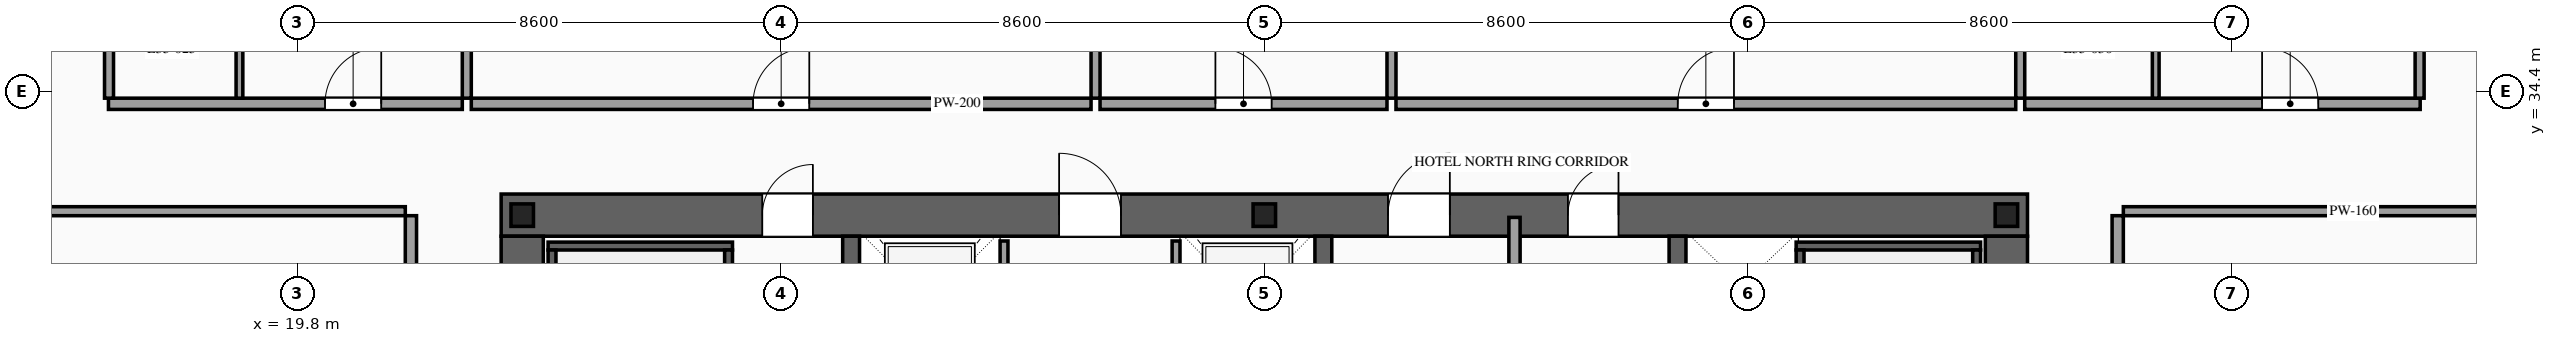
"""IFC4 building model, lengths in metres.
Left out: names, types, materials, properties, quantities, classifications, styles, units other than length and angle.
Written with IfcOpenShell. Run it as: python <this file> out.ifc"""

import sys

from ifc_helpers import new_model, si_unit, direction, frame, frame_2d, origin, origin_2d, place, context, subcontext, project, spatial, rectangle, i_section, extrude, source, transform, mapped, element, fill, save


model = new_model("IFC4")
c1 = context("Model", 3, precision=1e-05, world=origin(), true_north=direction((0.0, 1.0)))
c2 = subcontext(c1, "Body", "Model", "MODEL_VIEW")
j1 = project(units=[si_unit("LENGTHUNIT", "METRE"), si_unit("PLANEANGLEUNIT", "RADIAN")], contexts=[c1])
p1 = place(None, origin())
s1 = spatial("IfcSite", under=j1, at=p1, CompositionType="ELEMENT")
p2 = place(p1, origin())
s2 = spatial("IfcBuilding", under=s1, at=p2, CompositionType="ELEMENT")
p3 = place(p2, frame((0.0, 0.0, 134.4)))
s3 = spatial("IfcBuildingStorey", under=s2, at=p3, CompositionType="ELEMENT", Elevation=134.4)
p4 = place(p3, frame((23.425, 32.2, 0.0), z_axis=(0.0, 0.0, 1.0), x_axis=(1.0, 0.0, 0.0)))
e1 = element("IfcWall", 1, at=p4, inside=s3, PredefinedType="SHEAR", context=c2, shape_type="SweptSolid", body=[
    extrude(rectangle(XDim=27.15, YDim=0.75, at=frame_2d((13.575, 0.0))), origin(), (0.0, 0.0, 1.0), 3.6),
])
p5 = place(p4, frame((4.645, 0.0, 0.0)))
e2 = element("IfcOpeningElement", 2, at=p5, cuts=e1, PredefinedType="OPENING", context=c2, shape_type="SweptSolid", body=[
    extrude(rectangle(XDim=0.9, YDim=2.15, at=frame_2d((0.45, 1.075))), frame((0.0, 0.39, 0.0), z_axis=(0.0, -1.0, 0.0), x_axis=(1.0, 0.0, 0.0)), (0.0, 0.0, 1.0), 0.78),
])
p6 = place(p4, frame((9.925, 0.0, 0.0)))
e3 = element("IfcOpeningElement", 3, at=p6, cuts=e1, PredefinedType="OPENING", context=c2, shape_type="SweptSolid", body=[
    extrude(rectangle(XDim=1.1, YDim=2.2, at=frame_2d((0.55, 1.1))), frame((0.0, 0.39, 0.0), z_axis=(0.0, -1.0, 0.0), x_axis=(1.0, 0.0, 0.0)), (0.0, 0.0, 1.0), 0.78),
])
p7 = place(p4, frame((15.775, 0.0, 0.0)))
e4 = element("IfcOpeningElement", 4, at=p7, cuts=e1, PredefinedType="OPENING", context=c2, shape_type="SweptSolid", body=[
    extrude(rectangle(XDim=1.1, YDim=2.2, at=frame_2d((0.55, 1.1))), frame((0.0, 0.39, 0.0), z_axis=(0.0, -1.0, 0.0), x_axis=(1.0, 0.0, 0.0)), (0.0, 0.0, 1.0), 0.78),
])
p8 = place(p4, frame((18.975, 0.0, 0.0)))
e5 = element("IfcOpeningElement", 5, at=p8, cuts=e1, PredefinedType="OPENING", context=c2, shape_type="SweptSolid", body=[
    extrude(rectangle(XDim=0.9, YDim=2.15, at=frame_2d((0.45, 1.075))), frame((0.0, 0.39, 0.0), z_axis=(0.0, -1.0, 0.0), x_axis=(1.0, 0.0, 0.0)), (0.0, 0.0, 1.0), 0.78),
])
m1 = source(origin(), c2, "Body", "SweptSolid", [
    extrude(rectangle(XDim=12.05, YDim=0.75, at=frame_2d((6.025, 0.0))), origin(), (0.0, 0.0, 1.0), 3.6),
])
for number, where, z_axis, x_axis in (
    (6, (23.8, 19.775, 0.0), (0.0, 0.0, 1.0), (0.0, 1.0, 0.0)),
    (7, (50.2, 19.775, 0.0), (0.0, 0.0, 1.0), (0.0, 1.0, 0.0)),
):
    element("IfcWall", number, at=place(p3, frame(where, z_axis=z_axis, x_axis=x_axis)), inside=s3, PredefinedType="SHEAR", context=c2, shape_type="MappedRepresentation", body=[
        mapped(m1, transform((0.0, 0.0, 0.0), scale=1.0)),
    ])
m2 = source(origin(), c2, "Body", "SweptSolid", [
    extrude(rectangle(XDim=12.05, YDim=0.3, at=frame_2d((6.025, 0.0))), origin(), (0.0, 0.0, 1.0), 3.6),
])
for number, where, z_axis, x_axis in (
    (8, (29.65, 19.775, 0.0), (0.0, 0.0, 1.0), (0.0, 1.0, 0.0)),
    (9, (38.05, 19.775, 0.0), (0.0, 0.0, 1.0), (0.0, 1.0, 0.0)),
    (10, (44.35, 19.775, 0.0), (0.0, 0.0, 1.0), (0.0, 1.0, 0.0)),
):
    element("IfcWall", number, at=place(p3, frame(where, z_axis=z_axis, x_axis=x_axis)), inside=s3, PredefinedType="SOLIDWALL", context=c2, shape_type="MappedRepresentation", body=[
        mapped(m2, transform((0.0, 0.0, 0.0), scale=1.0)),
    ])
m3 = source(origin(), c2, "Body", "SweptSolid", [
    extrude(i_section(OverallWidth=0.4, OverallDepth=0.4, WebThickness=0.013, FlangeThickness=0.021, at=origin_2d()), origin(), (0.0, 0.0, 1.0), 3.6),
])
for number, where, z_axis, x_axis in (
    (11, (23.8, 32.2, 0.0), (0.0, 0.0, 1.0), (1.0, 0.0, 0.0)),
    (12, (37.0, 32.2, 0.0), (0.0, 0.0, 1.0), (1.0, 0.0, 0.0)),
    (13, (50.2, 32.2, 0.0), (0.0, 0.0, 1.0), (1.0, 0.0, 0.0)),
):
    element("IfcColumn", number, at=place(p3, frame(where, z_axis=z_axis, x_axis=x_axis)), inside=s3, PredefinedType="COLUMN", context=c2, shape_type="MappedRepresentation", body=[
        mapped(m3, transform((0.0, 0.0, 0.0), scale=1.0)),
    ])
p9 = place(p3, frame((32.37, 29.4, 0.0), z_axis=(0.0, 0.0, 1.0), x_axis=(0.0, 1.0, 0.0)))
e14 = element("IfcWall", 14, at=p9, inside=s3, PredefinedType="SOLIDWALL", context=c2, shape_type="SweptSolid", body=[
    extrude(rectangle(XDim=2.34, YDim=0.14, at=frame_2d((1.17, 0.0))), origin(), (0.0, 0.0, 1.0), 3.38),
])
p10 = place(p9, frame((0.62, 0.0, 0.0)))
e15 = element("IfcOpeningElement", 15, at=p10, cuts=e14, PredefinedType="OPENING", context=c2, shape_type="SweptSolid", body=[
    extrude(rectangle(XDim=1.1, YDim=2.2, at=frame_2d((0.55, 1.1))), frame((0.0, 0.085, 0.0), z_axis=(0.0, -1.0, 0.0), x_axis=(1.0, 0.0, 0.0)), (0.0, 0.0, 1.0), 0.17),
])
p11 = place(p3, frame((35.43, 29.4, 0.0), z_axis=(0.0, 0.0, 1.0), x_axis=(0.0, 1.0, 0.0)))
e16 = element("IfcWall", 16, at=p11, inside=s3, PredefinedType="SOLIDWALL", context=c2, shape_type="SweptSolid", body=[
    extrude(rectangle(XDim=2.34, YDim=0.14, at=frame_2d((1.17, 0.0))), origin(), (0.0, 0.0, 1.0), 3.38),
])
p12 = place(p11, frame((0.62, 0.0, 0.0)))
e17 = element("IfcOpeningElement", 17, at=p12, cuts=e16, PredefinedType="OPENING", context=c2, shape_type="SweptSolid", body=[
    extrude(rectangle(XDim=1.1, YDim=2.2, at=frame_2d((0.55, 1.1))), frame((0.0, 0.085, 0.0), z_axis=(0.0, -1.0, 0.0), x_axis=(1.0, 0.0, 0.0)), (0.0, 0.0, 1.0), 0.17),
])
m4 = source(origin(), c2, "Body", "SweptSolid", [
    extrude(rectangle(XDim=3.28, YDim=0.14, at=frame_2d((1.64, 0.0))), origin(), (0.0, 0.0, 1.0), 3.38),
])
p13 = place(p3, frame((24.26, 31.65, 0.0), z_axis=(0.0, 0.0, 1.0), x_axis=(1.0, 0.0, 0.0)))
e18 = element("IfcWall", 18, at=p13, inside=s3, PredefinedType="SOLIDWALL", context=c2, shape_type="MappedRepresentation", body=[
    mapped(m4, transform((0.0, 0.0, 0.0), scale=1.0)),
])
m5 = source(origin(), c2, "Body", "SweptSolid", [
    extrude(rectangle(XDim=8.94, YDim=0.14, at=frame_2d((4.47, 0.0))), origin(), (0.0, 0.0, 1.0), 3.38),
])
for number, where, z_axis, x_axis in (
    (19, (24.33, 22.64, 0.0), (0.0, 0.0, 1.0), (0.0, 1.0, 0.0)),
    (20, (27.47, 22.64, 0.0), (0.0, 0.0, 1.0), (0.0, 1.0, 0.0)),
):
    element("IfcWall", number, at=place(p3, frame(where, z_axis=z_axis, x_axis=x_axis)), inside=s3, PredefinedType="SOLIDWALL", context=c2, shape_type="MappedRepresentation", body=[
        mapped(m5, transform((0.0, 0.0, 0.0), scale=1.0)),
    ])
p14 = place(p3, frame((46.46, 31.65, 0.0), z_axis=(0.0, 0.0, 1.0), x_axis=(1.0, 0.0, 0.0)))
e21 = element("IfcWall", 21, at=p14, inside=s3, PredefinedType="SOLIDWALL", context=c2, shape_type="MappedRepresentation", body=[
    mapped(m4, transform((0.0, 0.0, 0.0), scale=1.0)),
])
for number, where, z_axis, x_axis in (
    (22, (46.53, 22.64, 0.0), (0.0, 0.0, 1.0), (0.0, 1.0, 0.0)),
    (23, (49.67, 22.64, 0.0), (0.0, 0.0, 1.0), (0.0, 1.0, 0.0)),
):
    element("IfcWall", number, at=place(p3, frame(where, z_axis=z_axis, x_axis=x_axis)), inside=s3, PredefinedType="SOLIDWALL", context=c2, shape_type="MappedRepresentation", body=[
        mapped(m5, transform((0.0, 0.0, 0.0), scale=1.0)),
    ])
m6 = source(origin(), c2, "Body", "SweptSolid", [
    extrude(rectangle(XDim=5.96, YDim=0.2, at=frame_2d((2.98, 0.0))), origin(), (0.0, 0.0, 1.0), 3.38),
])
p15 = place(p3, frame((41.45, 26.2, 0.0), z_axis=(0.0, 0.0, 1.0), x_axis=(0.0, 1.0, 0.0)))
e24 = element("IfcWall", 24, at=p15, inside=s3, PredefinedType="PARTITIONING", context=c2, shape_type="MappedRepresentation", body=[
    mapped(m6, transform((0.0, 0.0, 0.0), scale=1.0)),
])
p16 = place(p3, frame((16.44, 34.18, 0.0), z_axis=(0.0, 0.0, 1.0), x_axis=(1.0, 0.0, 0.0)))
e25 = element("IfcWall", 25, at=p16, inside=s3, PredefinedType="PARTITIONING", context=c2, shape_type="SweptSolid", body=[
    extrude(rectangle(XDim=6.294, YDim=0.2, at=frame_2d((3.147, 0.0))), origin(), (0.0, 0.0, 1.0), 3.38),
])
p17 = place(p16, frame((3.852, 0.0, 0.0)))
e26 = element("IfcOpeningElement", 26, at=p17, cuts=e25, PredefinedType="OPENING", context=c2, shape_type="SweptSolid", body=[
    extrude(rectangle(XDim=1.0, YDim=2.2, at=frame_2d((0.5, 1.1))), frame((0.0, 0.115, 0.0), z_axis=(0.0, -1.0, 0.0), x_axis=(1.0, 0.0, 0.0)), (0.0, 0.0, 1.0), 0.23),
])
m7 = source(origin(), c2, "Body", "SweptSolid", [
    extrude(rectangle(XDim=14.97, YDim=0.16, at=frame_2d((7.485, 0.0))), origin(), (0.0, 0.0, 1.0), 3.38),
])
p18 = place(p3, frame((22.814, 34.28, 0.0), z_axis=(0.0, 0.0, 1.0), x_axis=(0.0, 1.0, 0.0)))
e27 = element("IfcWall", 27, at=p18, inside=s3, PredefinedType="PARTITIONING", context=c2, shape_type="MappedRepresentation", body=[
    mapped(m7, transform((0.0, 0.0, 0.0), scale=1.0)),
])
m8 = source(origin(), c2, "Body", "SweptSolid", [
    extrude(rectangle(XDim=2.42, YDim=0.12, at=frame_2d((1.21, 0.0))), origin(), (0.0, 0.0, 1.0), 3.38),
])
p19 = place(p3, frame((18.77, 34.28, 0.0), z_axis=(0.0, 0.0, 1.0), x_axis=(0.0, 1.0, 0.0)))
e28 = element("IfcWall", 28, at=p19, inside=s3, PredefinedType="PARTITIONING", context=c2, shape_type="MappedRepresentation", body=[
    mapped(m8, transform((0.0, 0.0, 0.0), scale=1.0)),
])
p20 = place(p3, frame((22.894, 34.18, 0.0), z_axis=(0.0, 0.0, 1.0), x_axis=(1.0, 0.0, 0.0)))
e29 = element("IfcWall", 29, at=p20, inside=s3, PredefinedType="PARTITIONING", context=c2, shape_type="SweptSolid", body=[
    extrude(rectangle(XDim=11.024, YDim=0.2, at=frame_2d((5.512, 0.0))), origin(), (0.0, 0.0, 1.0), 3.38),
])
p21 = place(p20, frame((5.012, 0.0, 0.0)))
e30 = element("IfcOpeningElement", 30, at=p21, cuts=e29, PredefinedType="OPENING", context=c2, shape_type="SweptSolid", body=[
    extrude(rectangle(XDim=1.0, YDim=2.2, at=frame_2d((0.5, 1.1))), frame((0.0, 0.115, 0.0), z_axis=(0.0, -1.0, 0.0), x_axis=(1.0, 0.0, 0.0)), (0.0, 0.0, 1.0), 0.23),
])
p22 = place(p3, frame((33.998, 34.28, 0.0), z_axis=(0.0, 0.0, 1.0), x_axis=(0.0, 1.0, 0.0)))
e31 = element("IfcWall", 31, at=p22, inside=s3, PredefinedType="PARTITIONING", context=c2, shape_type="MappedRepresentation", body=[
    mapped(m7, transform((0.0, 0.0, 0.0), scale=1.0)),
])
p23 = place(p3, frame((34.078, 34.18, 0.0), z_axis=(0.0, 0.0, 1.0), x_axis=(1.0, 0.0, 0.0)))
e32 = element("IfcWall", 32, at=p23, inside=s3, PredefinedType="PARTITIONING", context=c2, shape_type="SweptSolid", body=[
    extrude(rectangle(XDim=5.104, YDim=0.2, at=frame_2d((2.552, 0.0))), origin(), (0.0, 0.0, 1.0), 3.38),
])
p24 = place(p23, frame((2.052, 0.0, 0.0)))
e33 = element("IfcOpeningElement", 33, at=p24, cuts=e32, PredefinedType="OPENING", context=c2, shape_type="SweptSolid", body=[
    extrude(rectangle(XDim=1.0, YDim=2.2, at=frame_2d((0.5, 1.1))), frame((0.0, 0.115, 0.0), z_axis=(0.0, -1.0, 0.0), x_axis=(1.0, 0.0, 0.0)), (0.0, 0.0, 1.0), 0.23),
])
p25 = place(p3, frame((39.262, 34.28, 0.0), z_axis=(0.0, 0.0, 1.0), x_axis=(0.0, 1.0, 0.0)))
e34 = element("IfcWall", 34, at=p25, inside=s3, PredefinedType="PARTITIONING", context=c2, shape_type="MappedRepresentation", body=[
    mapped(m7, transform((0.0, 0.0, 0.0), scale=1.0)),
])
p26 = place(p3, frame((39.342, 34.18, 0.0), z_axis=(0.0, 0.0, 1.0), x_axis=(1.0, 0.0, 0.0)))
e35 = element("IfcWall", 35, at=p26, inside=s3, PredefinedType="PARTITIONING", context=c2, shape_type="SweptSolid", body=[
    extrude(rectangle(XDim=11.024, YDim=0.2, at=frame_2d((5.512, 0.0))), origin(), (0.0, 0.0, 1.0), 3.38),
])
p27 = place(p26, frame((5.012, 0.0, 0.0)))
e36 = element("IfcOpeningElement", 36, at=p27, cuts=e35, PredefinedType="OPENING", context=c2, shape_type="SweptSolid", body=[
    extrude(rectangle(XDim=1.0, YDim=2.2, at=frame_2d((0.5, 1.1))), frame((0.0, 0.115, 0.0), z_axis=(0.0, -1.0, 0.0), x_axis=(1.0, 0.0, 0.0)), (0.0, 0.0, 1.0), 0.23),
])
p28 = place(p3, frame((50.446, 34.28, 0.0), z_axis=(0.0, 0.0, 1.0), x_axis=(0.0, 1.0, 0.0)))
e37 = element("IfcWall", 37, at=p28, inside=s3, PredefinedType="PARTITIONING", context=c2, shape_type="MappedRepresentation", body=[
    mapped(m7, transform((0.0, 0.0, 0.0), scale=1.0)),
])
p29 = place(p3, frame((50.526, 34.18, 0.0), z_axis=(0.0, 0.0, 1.0), x_axis=(1.0, 0.0, 0.0)))
e38 = element("IfcWall", 38, at=p29, inside=s3, PredefinedType="PARTITIONING", context=c2, shape_type="SweptSolid", body=[
    extrude(rectangle(XDim=7.034, YDim=0.2, at=frame_2d((3.517, 0.0))), origin(), (0.0, 0.0, 1.0), 3.38),
])
p30 = place(p29, frame((4.222, 0.0, 0.0)))
e39 = element("IfcOpeningElement", 39, at=p30, cuts=e38, PredefinedType="OPENING", context=c2, shape_type="SweptSolid", body=[
    extrude(rectangle(XDim=1.0, YDim=2.2, at=frame_2d((0.5, 1.1))), frame((0.0, 0.115, 0.0), z_axis=(0.0, -1.0, 0.0), x_axis=(1.0, 0.0, 0.0)), (0.0, 0.0, 1.0), 0.23),
])
m9 = source(origin(), c2, "Body", "SweptSolid", [
    extrude(rectangle(XDim=14.82, YDim=0.16, at=frame_2d((7.41, 0.0))), origin(), (0.0, 0.0, 1.0), 3.38),
])
for number, where, z_axis, x_axis in (
    (40, (16.45, 34.28, 0.0), (0.0, 0.0, 1.0), (0.0, 1.0, 0.0)),
    (41, (57.55, 34.28, 0.0), (0.0, 0.0, 1.0), (0.0, 1.0, 0.0)),
):
    element("IfcWall", number, at=place(p3, frame(where, z_axis=z_axis, x_axis=x_axis)), inside=s3, PredefinedType="PARTITIONING", context=c2, shape_type="MappedRepresentation", body=[
        mapped(m9, transform((0.0, 0.0, 0.0), scale=1.0)),
    ])
p31 = place(p3, frame((52.856, 34.28, 0.0), z_axis=(0.0, 0.0, 1.0), x_axis=(0.0, 1.0, 0.0)))
e42 = element("IfcWall", 42, at=p31, inside=s3, PredefinedType="PARTITIONING", context=c2, shape_type="MappedRepresentation", body=[
    mapped(m8, transform((0.0, 0.0, 0.0), scale=1.0)),
])
p32 = place(p3, frame((21.82, 25.88, 0.0), z_axis=(0.0, 0.0, 1.0), x_axis=(0.0, 1.0, 0.0)))
e43 = element("IfcWall", 43, at=p32, inside=s3, PredefinedType="PARTITIONING", context=c2, shape_type="SweptSolid", body=[
    extrude(rectangle(XDim=6.31, YDim=0.2, at=frame_2d((3.155, 0.0))), origin(), (0.0, 0.0, 1.0), 3.38),
])
p33 = place(p32, frame((3.835, 0.0, 0.0)))
e44 = element("IfcOpeningElement", 44, at=p33, cuts=e43, PredefinedType="OPENING", context=c2, shape_type="SweptSolid", body=[
    extrude(rectangle(XDim=1.0, YDim=2.2, at=frame_2d((0.5, 1.1))), frame((0.0, 0.115, 0.0), z_axis=(0.0, -1.0, 0.0), x_axis=(1.0, 0.0, 0.0)), (0.0, 0.0, 1.0), 0.23),
])
m10 = source(origin(), c2, "Body", "SweptSolid", [
    extrude(rectangle(XDim=8.17, YDim=0.16, at=frame_2d((4.085, 0.0))), origin(), (0.0, 0.0, 1.0), 2.875),
])
p34 = place(p3, frame((13.55, 32.27, 0.0), z_axis=(0.0, 0.0, 1.0), x_axis=(1.0, 0.0, 0.0)))
e45 = element("IfcWall", 45, at=p34, inside=s3, PredefinedType="PARTITIONING", context=c2, shape_type="MappedRepresentation", body=[
    mapped(m10, transform((0.0, 0.0, 0.0), scale=1.0)),
])
p35 = place(p3, frame((52.18, 25.88, 0.0), z_axis=(0.0, 0.0, 1.0), x_axis=(0.0, 1.0, 0.0)))
e46 = element("IfcWall", 46, at=p35, inside=s3, PredefinedType="PARTITIONING", context=c2, shape_type="SweptSolid", body=[
    extrude(rectangle(XDim=6.31, YDim=0.2, at=frame_2d((3.155, 0.0))), origin(), (0.0, 0.0, 1.0), 3.38),
])
p36 = place(p35, frame((3.835, 0.0, 0.0)))
e47 = element("IfcOpeningElement", 47, at=p36, cuts=e46, PredefinedType="OPENING", context=c2, shape_type="SweptSolid", body=[
    extrude(rectangle(XDim=1.0, YDim=2.2, at=frame_2d((0.5, 1.1))), frame((0.0, 0.115, 0.0), z_axis=(0.0, -1.0, 0.0), x_axis=(1.0, 0.0, 0.0)), (0.0, 0.0, 1.0), 0.23),
])
p37 = place(p3, frame((52.28, 32.27, 0.0), z_axis=(0.0, 0.0, 1.0), x_axis=(1.0, 0.0, 0.0)))
e48 = element("IfcWall", 48, at=p37, inside=s3, PredefinedType="PARTITIONING", context=c2, shape_type="MappedRepresentation", body=[
    mapped(m10, transform((0.0, 0.0, 0.0), scale=1.0)),
])
m11 = source(origin(), c2, "Body", "SweptSolid", [
    extrude(rectangle(XDim=0.9, YDim=2.15, at=frame_2d((0.45, 1.075))), frame((0.0, 0.025, 0.0), z_axis=(0.0, -1.0, 0.0), x_axis=(1.0, 0.0, 0.0)), (0.0, 0.0, 1.0), 0.05),
])
p38 = place(p5, origin())
e49 = element("IfcDoor", 49, at=p38, inside=s3, OperationType="SINGLE_SWING_RIGHT", PredefinedType="DOOR", context=c2, shape_type="MappedRepresentation", body=[
    mapped(m11, transform((0.0, 0.0, 0.0), scale=1.0)),
])
fill(e2, e49)
m12 = source(origin(), c2, "Body", "SweptSolid", [
    extrude(rectangle(XDim=1.1, YDim=2.2, at=frame_2d((0.55, 1.1))), frame((0.0, 0.025, 0.0), z_axis=(0.0, -1.0, 0.0), x_axis=(1.0, 0.0, 0.0)), (0.0, 0.0, 1.0), 0.05),
])
p39 = place(p6, origin())
e50 = element("IfcDoor", 50, at=p39, inside=s3, OperationType="SINGLE_SWING_LEFT", PredefinedType="DOOR", context=c2, shape_type="MappedRepresentation", body=[
    mapped(m12, transform((0.0, 0.0, 0.0), scale=1.0)),
])
fill(e3, e50)
p40 = place(p7, origin())
e51 = element("IfcDoor", 51, at=p40, inside=s3, OperationType="SINGLE_SWING_RIGHT", PredefinedType="DOOR", context=c2, shape_type="MappedRepresentation", body=[
    mapped(m12, transform((0.0, 0.0, 0.0), scale=1.0)),
])
fill(e4, e51)
p41 = place(p8, origin())
e52 = element("IfcDoor", 52, at=p41, inside=s3, OperationType="SINGLE_SWING_RIGHT", PredefinedType="DOOR", context=c2, shape_type="MappedRepresentation", body=[
    mapped(m11, transform((0.0, 0.0, 0.0), scale=1.0)),
])
fill(e5, e52)
m13 = source(origin(), c2, "Body", "SweptSolid", [
    extrude(rectangle(XDim=1.0, YDim=2.2, at=frame_2d((0.5, 1.1))), frame((0.0, 0.025, 0.0), z_axis=(0.0, -1.0, 0.0), x_axis=(1.0, 0.0, 0.0)), (0.0, 0.0, 1.0), 0.05),
])
p42 = place(p17, origin())
e53 = element("IfcDoor", 53, at=p42, inside=s3, OperationType="SINGLE_SWING_RIGHT", PredefinedType="DOOR", context=c2, shape_type="MappedRepresentation", body=[
    mapped(m13, transform((0.0, 0.0, 0.0), scale=1.0)),
])
fill(e26, e53)
p43 = place(p21, origin())
e54 = element("IfcDoor", 54, at=p43, inside=s3, OperationType="SINGLE_SWING_RIGHT", PredefinedType="DOOR", context=c2, shape_type="MappedRepresentation", body=[
    mapped(m13, transform((0.0, 0.0, 0.0), scale=1.0)),
])
fill(e30, e54)
p44 = place(p24, origin())
e55 = element("IfcDoor", 55, at=p44, inside=s3, OperationType="SINGLE_SWING_LEFT", PredefinedType="DOOR", context=c2, shape_type="MappedRepresentation", body=[
    mapped(m13, transform((0.0, 0.0, 0.0), scale=1.0)),
])
fill(e33, e55)
p45 = place(p27, origin())
e56 = element("IfcDoor", 56, at=p45, inside=s3, OperationType="SINGLE_SWING_RIGHT", PredefinedType="DOOR", context=c2, shape_type="MappedRepresentation", body=[
    mapped(m13, transform((0.0, 0.0, 0.0), scale=1.0)),
])
fill(e36, e56)
p46 = place(p30, origin())
e57 = element("IfcDoor", 57, at=p46, inside=s3, OperationType="SINGLE_SWING_LEFT", PredefinedType="DOOR", context=c2, shape_type="MappedRepresentation", body=[
    mapped(m13, transform((0.0, 0.0, 0.0), scale=1.0)),
])
fill(e39, e57)
save(model, sys.argv[1])
